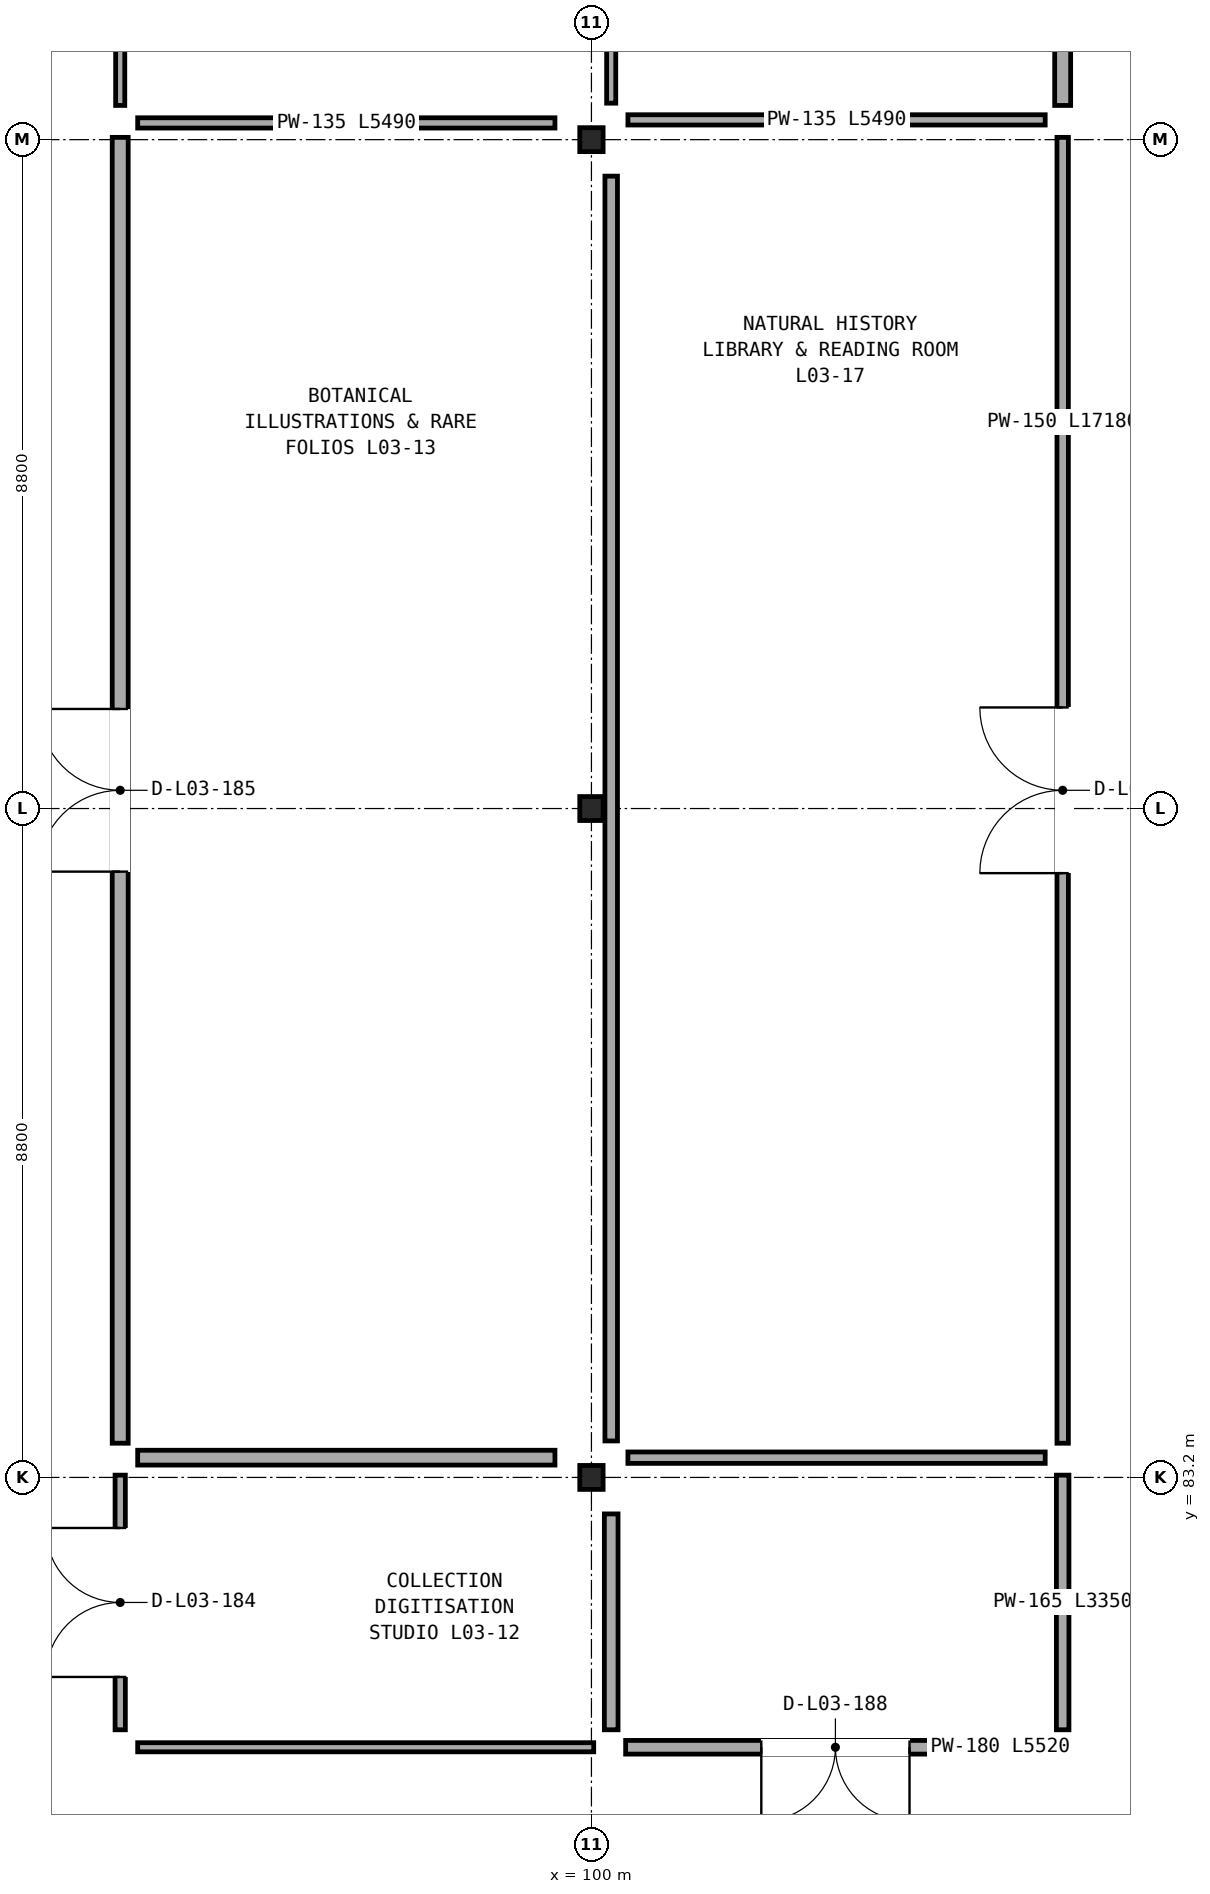
"""IFC4 building model, lengths in metres.
Left out: names, types, materials, properties, quantities, classifications, styles, units other than length and angle.
Written with IfcOpenShell. Run it as: python <this file> out.ifc"""

import sys

from ifc_helpers import new_model, si_unit, direction, frame, frame_2d, origin, origin_2d, place, context, subcontext, project, spatial, rectangle, i_section, extrude, element, fill, save


model = new_model("IFC4")
c1 = context("Model", 3, precision=1e-05, world=origin(), true_north=direction((0.0, 1.0)))
c2 = subcontext(c1, "Body", "Model", "MODEL_VIEW")
j1 = project(units=[si_unit("LENGTHUNIT", "METRE"), si_unit("PLANEANGLEUNIT", "RADIAN")], contexts=[c1])
p1 = place(None, origin())
s1 = spatial("IfcSite", under=j1, at=p1, CompositionType="ELEMENT")
p2 = place(p1, origin())
s2 = spatial("IfcBuilding", under=s1, at=p2, CompositionType="ELEMENT")
p3 = place(p2, frame((0.0, 0.0, 14.6)))
s3 = spatial("IfcBuildingStorey", under=s2, at=p3, CompositionType="ELEMENT", Elevation=14.6)
for number, where, z_axis, x_axis in (
    (1, (100.0, 83.2, 0.0), (0.0, 0.0, 1.0), (1.0, 0.0, 0.0)),
    (2, (100.0, 92.0, 0.0), (0.0, 0.0, 1.0), (1.0, 0.0, 0.0)),
    (3, (100.0, 100.8, 0.0), (0.0, 0.0, 1.0), (1.0, 0.0, 0.0)),
):
    element("IfcColumn", number, at=place(p3, frame(where, z_axis=z_axis, x_axis=x_axis)), inside=s3, PredefinedType="COLUMN", context=c2, shape_type="SweptSolid", body=[
        extrude(i_section(OverallWidth=0.307, OverallDepth=0.315, WebThickness=0.012, FlangeThickness=0.019, FilletRadius=0.017, at=origin_2d()), origin(), (0.0, 0.0, 1.0), 4.5),
    ])
p4 = place(p3, frame((93.8, 101.25, 0.0), z_axis=(0.0, 0.0, 1.0), x_axis=(0.0, 1.0, 0.0)))
e4 = element("IfcWall", 4, at=p4, inside=s3, PredefinedType="PARTITIONING", context=c2, shape_type="SweptSolid", body=[
    extrude(rectangle(XDim=6.39, YDim=0.12, at=frame_2d((3.195, 0.0))), origin(), (0.0, 0.0, 1.0), 4.13),
])
p5 = place(p4, frame((2.385, 0.0, 0.0)))
e5 = element("IfcOpeningElement", 5, at=p5, cuts=e4, PredefinedType="OPENING", context=c2, shape_type="SweptSolid", body=[
    extrude(rectangle(XDim=1.62, YDim=2.46, at=frame_2d((0.81, 1.23))), frame((0.0, 0.07, 0.0), z_axis=(0.0, -1.0, 0.0), x_axis=(1.0, 0.0, 0.0)), (0.0, 0.0, 1.0), 0.14),
])
p6 = place(p3, frame((93.8, 79.88, 0.0), z_axis=(0.0, 0.0, 1.0), x_axis=(0.0, 1.0, 0.0)))
e6 = element("IfcWall", 6, at=p6, inside=s3, PredefinedType="PARTITIONING", context=c2, shape_type="SweptSolid", body=[
    extrude(rectangle(XDim=3.35, YDim=0.135, at=frame_2d((1.675, 0.0))), origin(), (0.0, 0.0, 1.0), 3.687),
])
p7 = place(p6, frame((0.695, 0.0, 0.0)))
e7 = element("IfcOpeningElement", 7, at=p7, cuts=e6, PredefinedType="OPENING", context=c2, shape_type="SweptSolid", body=[
    extrude(rectangle(XDim=1.96, YDim=2.46, at=frame_2d((0.98, 1.23))), frame((0.0, 0.078, 0.0), z_axis=(0.0, -1.0, 0.0), x_axis=(1.0, 0.0, 0.0)), (0.0, 0.0, 1.0), 0.155),
])
p8 = place(p3, frame((100.03, 79.65, 0.0), z_axis=(0.0, 0.0, 1.0), x_axis=(-1.0, 0.0, 0.0)))
e8 = element("IfcWall", 8, at=p8, inside=s3, PredefinedType="PARTITIONING", context=c2, shape_type="SweptSolid", body=[
    extrude(rectangle(XDim=6.0, YDim=0.12, at=frame_2d((3.0, 0.0))), origin(), (0.0, 0.0, 1.0), 4.13),
])
p9 = place(p3, frame((93.8, 83.65, 0.0), z_axis=(0.0, 0.0, 1.0), x_axis=(0.0, 1.0, 0.0)))
e9 = element("IfcWall", 9, at=p9, inside=s3, PredefinedType="PARTITIONING", context=c2, shape_type="SweptSolid", body=[
    extrude(rectangle(XDim=17.18, YDim=0.21, at=frame_2d((8.59, 0.0))), origin(), (0.0, 0.0, 1.0), 3.687),
])
p10 = place(p9, frame((7.52, 0.0, 0.0)))
e10 = element("IfcOpeningElement", 10, at=p10, cuts=e9, PredefinedType="OPENING", context=c2, shape_type="SweptSolid", body=[
    extrude(rectangle(XDim=2.14, YDim=2.46, at=frame_2d((1.07, 1.23))), frame((0.0, 0.115, 0.0), z_axis=(0.0, -1.0, 0.0), x_axis=(1.0, 0.0, 0.0)), (0.0, 0.0, 1.0), 0.23),
])
p11 = place(p3, frame((105.97, 79.65, 0.0), z_axis=(0.0, 0.0, 1.0), x_axis=(-1.0, 0.0, 0.0)))
e11 = element("IfcWall", 11, at=p11, inside=s3, PredefinedType="PARTITIONING", context=c2, shape_type="SweptSolid", body=[
    extrude(rectangle(XDim=5.52, YDim=0.18, at=frame_2d((2.76, 0.0))), origin(), (0.0, 0.0, 1.0), 4.13),
])
p12 = place(p11, frame((1.785, 0.0, 0.0)))
e12 = element("IfcOpeningElement", 12, at=p12, cuts=e11, PredefinedType="OPENING", context=c2, shape_type="SweptSolid", body=[
    extrude(rectangle(XDim=1.95, YDim=2.58, at=frame_2d((0.975, 1.29))), frame((0.0, 0.1, 0.0), z_axis=(0.0, -1.0, 0.0), x_axis=(1.0, 0.0, 0.0)), (0.0, 0.0, 1.0), 0.2),
])
p13 = place(p3, frame((106.2, 83.23, 0.0), z_axis=(0.0, 0.0, 1.0), x_axis=(0.0, -1.0, 0.0)))
e13 = element("IfcWall", 13, at=p13, inside=s3, PredefinedType="PARTITIONING", context=c2, shape_type="SweptSolid", body=[
    extrude(rectangle(XDim=3.35, YDim=0.165, at=frame_2d((1.675, 0.0))), origin(), (0.0, 0.0, 1.0), 3.687),
])
p14 = place(p3, frame((106.2, 100.83, 0.0), z_axis=(0.0, 0.0, 1.0), x_axis=(0.0, -1.0, 0.0)))
e14 = element("IfcWall", 14, at=p14, inside=s3, PredefinedType="PARTITIONING", context=c2, shape_type="SweptSolid", body=[
    extrude(rectangle(XDim=17.18, YDim=0.15, at=frame_2d((8.59, 0.0))), origin(), (0.0, 0.0, 1.0), 3.687),
])
p15 = place(p14, frame((7.5, 0.0, 0.0)))
e15 = element("IfcOpeningElement", 15, at=p15, cuts=e14, PredefinedType="OPENING", context=c2, shape_type="SweptSolid", body=[
    extrude(rectangle(XDim=2.18, YDim=2.58, at=frame_2d((1.09, 1.29))), frame((0.0, 0.085, 0.0), z_axis=(0.0, -1.0, 0.0), x_axis=(1.0, 0.0, 0.0)), (0.0, 0.0, 1.0), 0.17),
])
p16 = place(p3, frame((106.2, 107.64, 0.0), z_axis=(0.0, 0.0, 1.0), x_axis=(0.0, -1.0, 0.0)))
e16 = element("IfcWall", 16, at=p16, inside=s3, PredefinedType="PARTITIONING", context=c2, shape_type="SweptSolid", body=[
    extrude(rectangle(XDim=6.39, YDim=0.21, at=frame_2d((3.195, 0.0))), origin(), (0.0, 0.0, 1.0), 4.13),
])
p17 = place(p3, frame((99.52, 101.02, 0.0), z_axis=(0.0, 0.0, 1.0), x_axis=(-1.0, 0.0, 0.0)))
e17 = element("IfcWall", 17, at=p17, inside=s3, PredefinedType="PARTITIONING", context=c2, shape_type="SweptSolid", body=[
    extrude(rectangle(XDim=5.49, YDim=0.135, at=frame_2d((2.745, 0.0))), origin(), (0.0, 0.0, 1.0), 3.687),
])
p18 = place(p3, frame((100.26, 107.92, 0.0), z_axis=(0.0, 0.0, 1.0), x_axis=(0.0, -1.0, 0.0)))
e18 = element("IfcWall", 18, at=p18, inside=s3, PredefinedType="PARTITIONING", context=c2, shape_type="SweptSolid", body=[
    extrude(rectangle(XDim=6.64, YDim=0.12, at=frame_2d((3.32, 0.0))), origin(), (0.0, 0.0, 1.0), 3.763),
])
p19 = place(p3, frame((94.03, 83.46, 0.0), z_axis=(0.0, 0.0, 1.0), x_axis=(1.0, 0.0, 0.0)))
e19 = element("IfcWall", 19, at=p19, inside=s3, PredefinedType="PARTITIONING", context=c2, shape_type="SweptSolid", body=[
    extrude(rectangle(XDim=5.49, YDim=0.195, at=frame_2d((2.745, 0.0))), origin(), (0.0, 0.0, 1.0), 3.687),
])
p20 = place(p3, frame((100.26, 82.72, 0.0), z_axis=(0.0, 0.0, 1.0), x_axis=(0.0, -1.0, 0.0)))
e20 = element("IfcWall", 20, at=p20, inside=s3, PredefinedType="PARTITIONING", context=c2, shape_type="SweptSolid", body=[
    extrude(rectangle(XDim=2.84, YDim=0.18, at=frame_2d((1.42, 0.0))), origin(), (0.0, 0.0, 1.0), 4.13),
])
p21 = place(p3, frame((100.26, 100.32, 0.0), z_axis=(0.0, 0.0, 1.0), x_axis=(0.0, -1.0, 0.0)))
e21 = element("IfcWall", 21, at=p21, inside=s3, PredefinedType="PARTITIONING", context=c2, shape_type="SweptSolid", body=[
    extrude(rectangle(XDim=16.64, YDim=0.165, at=frame_2d((8.32, 0.0))), origin(), (0.0, 0.0, 1.0), 3.687),
])
p22 = place(p3, frame((100.48, 83.46, 0.0), z_axis=(0.0, 0.0, 1.0), x_axis=(1.0, 0.0, 0.0)))
e22 = element("IfcWall", 22, at=p22, inside=s3, PredefinedType="PARTITIONING", context=c2, shape_type="SweptSolid", body=[
    extrude(rectangle(XDim=5.49, YDim=0.15, at=frame_2d((2.745, 0.0))), origin(), (0.0, 0.0, 1.0), 3.687),
])
p23 = place(p3, frame((100.48, 101.06, 0.0), z_axis=(0.0, 0.0, 1.0), x_axis=(1.0, 0.0, 0.0)))
e23 = element("IfcWall", 23, at=p23, inside=s3, PredefinedType="PARTITIONING", context=c2, shape_type="SweptSolid", body=[
    extrude(rectangle(XDim=5.49, YDim=0.135, at=frame_2d((2.745, 0.0))), origin(), (0.0, 0.0, 1.0), 3.687),
])
p24 = place(p7, origin())
e24 = element("IfcDoor", 24, at=p24, inside=s3, OperationType="DOUBLE_DOOR_SINGLE_SWING", PredefinedType="DOOR", context=c2, shape_type="SweptSolid", body=[
    extrude(rectangle(XDim=1.96, YDim=2.46, at=frame_2d((0.98, 1.23))), frame((0.0, 0.025, 0.0), z_axis=(0.0, -1.0, 0.0), x_axis=(1.0, 0.0, 0.0)), (0.0, 0.0, 1.0), 0.05),
])
fill(e7, e24)
p25 = place(p10, origin())
e25 = element("IfcDoor", 25, at=p25, inside=s3, OperationType="DOUBLE_DOOR_SINGLE_SWING", PredefinedType="DOOR", context=c2, shape_type="SweptSolid", body=[
    extrude(rectangle(XDim=2.14, YDim=2.46, at=frame_2d((1.07, 1.23))), frame((0.0, 0.025, 0.0), z_axis=(0.0, -1.0, 0.0), x_axis=(1.0, 0.0, 0.0)), (0.0, 0.0, 1.0), 0.05),
])
fill(e10, e25)
p26 = place(p12, origin())
e26 = element("IfcDoor", 26, at=p26, inside=s3, OperationType="DOUBLE_DOOR_SINGLE_SWING", PredefinedType="DOOR", context=c2, shape_type="SweptSolid", body=[
    extrude(rectangle(XDim=1.95, YDim=2.58, at=frame_2d((0.975, 1.29))), frame((0.0, 0.025, 0.0), z_axis=(0.0, -1.0, 0.0), x_axis=(1.0, 0.0, 0.0)), (0.0, 0.0, 1.0), 0.05),
])
fill(e12, e26)
p27 = place(p15, frame((2.18, 0.0, 0.0), z_axis=(0.0, 0.0, 1.0), x_axis=(-1.0, 0.0, 0.0)))
e27 = element("IfcDoor", 27, at=p27, inside=s3, OperationType="DOUBLE_DOOR_SINGLE_SWING", PredefinedType="DOOR", context=c2, shape_type="SweptSolid", body=[
    extrude(rectangle(XDim=2.18, YDim=2.58, at=frame_2d((1.09, 1.29))), frame((0.0, 0.025, 0.0), z_axis=(0.0, -1.0, 0.0), x_axis=(1.0, 0.0, 0.0)), (0.0, 0.0, 1.0), 0.05),
])
fill(e15, e27)
save(model, sys.argv[1])
